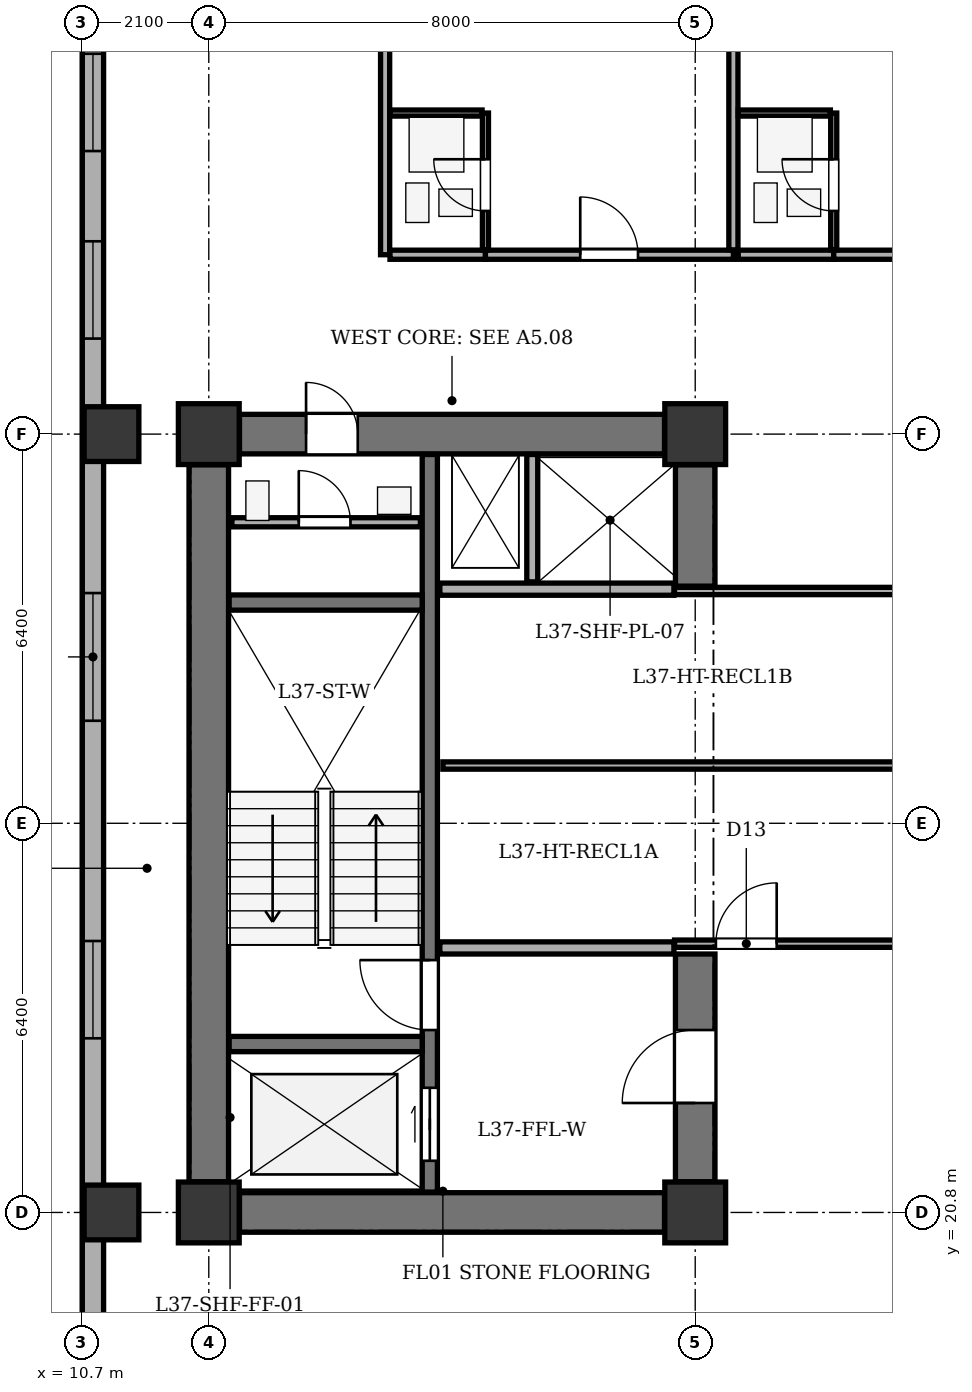
"""IFC4 building model, lengths in metres.
Left out: names, types, materials, properties, quantities, classifications, styles, units other than length and angle.
Written with IfcOpenShell. Run it as: python <this file> out.ifc"""

import sys

from ifc_helpers import new_model, si_unit, direction, frame, frame_2d, origin, origin_2d, place, context, subcontext, project, spatial, rectangle, extrude, element, fill, save


model = new_model("IFC4")
c1 = context("Model", 3, precision=1e-05, world=origin(), true_north=direction((0.0, 1.0)))
c2 = subcontext(c1, "Body", "Model", "MODEL_VIEW")
j1 = project(units=[si_unit("LENGTHUNIT", "METRE"), si_unit("PLANEANGLEUNIT", "RADIAN")], contexts=[c1])
p1 = place(None, origin())
s1 = spatial("IfcSite", under=j1, at=p1, CompositionType="ELEMENT")
p2 = place(p1, origin())
s2 = spatial("IfcBuilding", under=s1, at=p2, CompositionType="ELEMENT")
p3 = place(p2, frame((0.0, 0.0, 148.3)))
s3 = spatial("IfcBuildingStorey", under=s2, at=p3, CompositionType="ELEMENT", Elevation=148.3)
for number, where, z_axis, x_axis in (
    (1, (12.8, 20.8, 0.0), (0.0, 0.0, 1.0), (1.0, 0.0, 0.0)),
    (2, (20.8, 20.8, 0.0), (0.0, 0.0, 1.0), (1.0, 0.0, 0.0)),
    (3, (12.8, 33.6, 0.0), (0.0, 0.0, 1.0), (1.0, 0.0, 0.0)),
    (4, (20.8, 33.6, 0.0), (0.0, 0.0, 1.0), (1.0, 0.0, 0.0)),
):
    element("IfcColumn", number, at=place(p3, frame(where, z_axis=z_axis, x_axis=x_axis)), inside=s3, PredefinedType="COLUMN", context=c2, shape_type="SweptSolid", body=[
        extrude(rectangle(XDim=1.0, YDim=1.0, at=origin_2d()), origin(), (0.0, 0.0, 1.0), 3.5),
    ])
for number, where, z_axis, x_axis in (
    (5, (11.2, 20.8, 0.0), (0.0, 0.0, 1.0), (1.0, 0.0, 0.0)),
    (6, (11.2, 33.6, 0.0), (0.0, 0.0, 1.0), (1.0, 0.0, 0.0)),
):
    element("IfcColumn", number, at=place(p3, frame(where, z_axis=z_axis, x_axis=x_axis)), inside=s3, PredefinedType="COLUMN", context=c2, shape_type="SweptSolid", body=[
        extrude(rectangle(XDim=0.9, YDim=0.9, at=origin_2d()), origin(), (0.0, 0.0, 1.0), 3.5),
    ])
p4 = place(p3, frame((10.895, 6.5, 0.0), z_axis=(0.0, 0.0, 1.0), x_axis=(0.0, 1.0, 0.0)))
e7 = element("IfcWall", 7, at=p4, inside=s3, PredefinedType="STANDARD", context=c2, shape_type="SweptSolid", body=[
    extrude(rectangle(XDim=35.0, YDim=0.35, at=frame_2d((17.5, 0.0))), origin(), (0.0, 0.0, 1.0), 2.785),
])
p5 = place(p4, frame((3.31, 0.0, 0.75)))
e8 = element("IfcOpeningElement", 8, at=p5, cuts=e7, PredefinedType="OPENING", context=c2, shape_type="SweptSolid", body=[
    extrude(rectangle(XDim=1.6, YDim=1.75, at=frame_2d((0.8, 0.875))), frame((0.0, 0.185, 0.0), z_axis=(0.0, -1.0, 0.0), x_axis=(1.0, 0.0, 0.0)), (0.0, 0.0, 1.0), 0.37),
])
p6 = place(p4, frame((9.216, 0.0, 0.75)))
e9 = element("IfcOpeningElement", 9, at=p6, cuts=e7, PredefinedType="OPENING", context=c2, shape_type="SweptSolid", body=[
    extrude(rectangle(XDim=2.1, YDim=1.75, at=frame_2d((1.05, 0.875))), frame((0.0, 0.185, 0.0), z_axis=(0.0, -1.0, 0.0), x_axis=(1.0, 0.0, 0.0)), (0.0, 0.0, 1.0), 0.37),
])
p7 = place(p4, frame((17.164, 0.0, 0.75)))
e10 = element("IfcOpeningElement", 10, at=p7, cuts=e7, PredefinedType="OPENING", context=c2, shape_type="SweptSolid", body=[
    extrude(rectangle(XDim=1.6, YDim=1.75, at=frame_2d((0.8, 0.875))), frame((0.0, 0.185, 0.0), z_axis=(0.0, -1.0, 0.0), x_axis=(1.0, 0.0, 0.0)), (0.0, 0.0, 1.0), 0.37),
])
p8 = place(p4, frame((22.386, 0.0, 0.75)))
e11 = element("IfcOpeningElement", 11, at=p8, cuts=e7, PredefinedType="OPENING", context=c2, shape_type="SweptSolid", body=[
    extrude(rectangle(XDim=2.1, YDim=1.75, at=frame_2d((1.05, 0.875))), frame((0.0, 0.185, 0.0), z_axis=(0.0, -1.0, 0.0), x_axis=(1.0, 0.0, 0.0)), (0.0, 0.0, 1.0), 0.37),
])
p9 = place(p4, frame((28.671, 0.0, 0.75)))
e12 = element("IfcOpeningElement", 12, at=p9, cuts=e7, PredefinedType="OPENING", context=c2, shape_type="SweptSolid", body=[
    extrude(rectangle(XDim=1.6, YDim=1.75, at=frame_2d((0.8, 0.875))), frame((0.0, 0.185, 0.0), z_axis=(0.0, -1.0, 0.0), x_axis=(1.0, 0.0, 0.0)), (0.0, 0.0, 1.0), 0.37),
])
p10 = place(p4, frame((31.755, 0.0, 0.75)))
e13 = element("IfcOpeningElement", 13, at=p10, cuts=e7, PredefinedType="OPENING", context=c2, shape_type="SweptSolid", body=[
    extrude(rectangle(XDim=1.6, YDim=1.75, at=frame_2d((0.8, 0.875))), frame((0.0, 0.185, 0.0), z_axis=(0.0, -1.0, 0.0), x_axis=(1.0, 0.0, 0.0)), (0.0, 0.0, 1.0), 0.37),
])
p11 = place(p3, frame((12.8, 21.305, 0.0), z_axis=(0.0, 0.0, 1.0), x_axis=(0.0, 1.0, 0.0)))
e14 = element("IfcWall", 14, at=p11, inside=s3, PredefinedType="SHEAR", context=c2, shape_type="SweptSolid", body=[
    extrude(rectangle(XDim=11.79, YDim=0.65, at=frame_2d((5.895, 0.0))), origin(), (0.0, 0.0, 1.0), 3.2),
])
p12 = place(p3, frame((13.305, 20.8, 0.0), z_axis=(0.0, 0.0, 1.0), x_axis=(1.0, 0.0, 0.0)))
e15 = element("IfcWall", 15, at=p12, inside=s3, PredefinedType="SHEAR", context=c2, shape_type="SweptSolid", body=[
    extrude(rectangle(XDim=6.99, YDim=0.65, at=frame_2d((3.495, 0.0))), origin(), (0.0, 0.0, 1.0), 3.2),
])
p13 = place(p3, frame((13.305, 33.6, 0.0), z_axis=(0.0, 0.0, 1.0), x_axis=(1.0, 0.0, 0.0)))
e16 = element("IfcWall", 16, at=p13, inside=s3, PredefinedType="SHEAR", context=c2, shape_type="SweptSolid", body=[
    extrude(rectangle(XDim=6.99, YDim=0.65, at=frame_2d((3.495, 0.0))), origin(), (0.0, 0.0, 1.0), 3.2),
])
p14 = place(p13, frame((1.095, 0.0, 0.0)))
e17 = element("IfcOpeningElement", 17, at=p14, cuts=e16, PredefinedType="OPENING", context=c2, shape_type="SweptSolid", body=[
    extrude(rectangle(XDim=0.85, YDim=2.02, at=frame_2d((0.425, 1.01))), frame((0.0, 0.335, 0.0), z_axis=(0.0, -1.0, 0.0), x_axis=(1.0, 0.0, 0.0)), (0.0, 0.0, 1.0), 0.67),
])
p15 = place(p3, frame((20.8, 21.305, 0.0), z_axis=(0.0, 0.0, 1.0), x_axis=(0.0, 1.0, 0.0)))
e18 = element("IfcWall", 18, at=p15, inside=s3, PredefinedType="SHEAR", context=c2, shape_type="SweptSolid", body=[
    extrude(rectangle(XDim=3.745, YDim=0.65, at=frame_2d((1.873, 0.0))), origin(), (0.0, 0.0, 1.0), 3.2),
])
p16 = place(p15, frame((1.295, 0.0, 0.0)))
e19 = element("IfcOpeningElement", 19, at=p16, cuts=e18, PredefinedType="OPENING", context=c2, shape_type="SweptSolid", body=[
    extrude(rectangle(XDim=1.2, YDim=2.15, at=frame_2d((0.6, 1.075))), frame((0.0, 0.335, 0.0), z_axis=(0.0, -1.0, 0.0), x_axis=(1.0, 0.0, 0.0)), (0.0, 0.0, 1.0), 0.67),
])
p17 = place(p3, frame((20.8, 31.1, 0.0), z_axis=(0.0, 0.0, 1.0), x_axis=(0.0, 1.0, 0.0)))
e20 = element("IfcWall", 20, at=p17, inside=s3, PredefinedType="SHEAR", context=c2, shape_type="SweptSolid", body=[
    extrude(rectangle(XDim=1.995, YDim=0.65, at=frame_2d((0.998, 0.0))), origin(), (0.0, 0.0, 1.0), 3.2),
])
p18 = place(p3, frame((16.435, 21.135, 0.0), z_axis=(0.0, 0.0, 1.0), x_axis=(0.0, 1.0, 0.0)))
e21 = element("IfcWall", 21, at=p18, inside=s3, PredefinedType="SHEAR", context=c2, shape_type="SweptSolid", body=[
    extrude(rectangle(XDim=12.13, YDim=0.25, at=frame_2d((6.065, 0.0))), origin(), (0.0, 0.0, 1.0), 3.2),
])
p19 = place(p18, frame((0.515, 0.0, 0.0)))
e22 = element("IfcOpeningElement", 22, at=p19, cuts=e21, PredefinedType="OPENING", context=c2, shape_type="SweptSolid", body=[
    extrude(rectangle(XDim=1.2, YDim=2.15, at=frame_2d((0.6, 1.075))), frame((0.0, 0.135, 0.0), z_axis=(0.0, -1.0, 0.0), x_axis=(1.0, 0.0, 0.0)), (0.0, 0.0, 1.0), 0.27),
])
p20 = place(p18, frame((2.665, 0.0, 0.0)))
e23 = element("IfcOpeningElement", 23, at=p20, cuts=e21, PredefinedType="OPENING", context=c2, shape_type="SweptSolid", body=[
    extrude(rectangle(XDim=1.15, YDim=2.15, at=frame_2d((0.575, 1.075))), frame((0.0, 0.135, 0.0), z_axis=(0.0, -1.0, 0.0), x_axis=(1.0, 0.0, 0.0)), (0.0, 0.0, 1.0), 0.27),
])
for number, where, z_axis, x_axis in (
    (24, (13.135, 23.57, 0.0), (0.0, 0.0, 1.0), (1.0, 0.0, 0.0)),
    (25, (13.135, 30.83, 0.0), (0.0, 0.0, 1.0), (1.0, 0.0, 0.0)),
):
    element("IfcWall", number, at=place(p3, frame(where, z_axis=z_axis, x_axis=x_axis)), inside=s3, PredefinedType="SHEAR", context=c2, shape_type="SweptSolid", body=[
        extrude(rectangle(XDim=3.175, YDim=0.25, at=frame_2d((1.587, 0.0))), origin(), (0.0, 0.0, 1.0), 3.2),
    ])
for number, where, z_axis, x_axis in (
    (26, (16.6, 25.15, 0.0), (0.0, 0.0, 1.0), (1.0, 0.0, 0.0)),
    (27, (16.6, 31.05, 0.0), (0.0, 0.0, 1.0), (1.0, 0.0, 0.0)),
):
    element("IfcWall", number, at=place(p3, frame(where, z_axis=z_axis, x_axis=x_axis)), inside=s3, PredefinedType="SOLIDWALL", context=c2, shape_type="SweptSolid", body=[
        extrude(rectangle(XDim=3.85, YDim=0.2, at=frame_2d((1.925, 0.0))), origin(), (0.0, 0.0, 1.0), 3.2),
    ])
p21 = place(p3, frame((18.12, 31.17, 0.0), z_axis=(0.0, 0.0, 1.0), x_axis=(0.0, 1.0, 0.0)))
e28 = element("IfcWall", 28, at=p21, inside=s3, PredefinedType="PARTITIONING", context=c2, shape_type="SweptSolid", body=[
    extrude(rectangle(XDim=2.095, YDim=0.18, at=frame_2d((1.047, 0.0))), origin(), (0.0, 0.0, 1.0), 3.2),
])
p22 = place(p3, frame((13.18, 32.15, 0.0), z_axis=(0.0, 0.0, 1.0), x_axis=(1.0, 0.0, 0.0)))
e29 = element("IfcWall", 29, at=p22, inside=s3, PredefinedType="PARTITIONING", context=c2, shape_type="SweptSolid", body=[
    extrude(rectangle(XDim=3.1, YDim=0.15, at=frame_2d((1.55, 0.0))), origin(), (0.0, 0.0, 1.0), 3.2),
])
p23 = place(p22, frame((1.1, 0.0, 0.0)))
e30 = element("IfcOpeningElement", 30, at=p23, cuts=e29, PredefinedType="OPENING", context=c2, shape_type="SweptSolid", body=[
    extrude(rectangle(XDim=0.85, YDim=2.02, at=frame_2d((0.425, 1.01))), frame((0.0, 0.085, 0.0), z_axis=(0.0, -1.0, 0.0), x_axis=(1.0, 0.0, 0.0)), (0.0, 0.0, 1.0), 0.17),
])
p24 = place(p3, frame((20.46, 25.22, 0.0), z_axis=(0.0, 0.0, 1.0), x_axis=(1.0, 0.0, 0.0)))
e31 = element("IfcWall", 31, at=p24, inside=s3, PredefinedType="PARTITIONING", context=c2, shape_type="SweptSolid", body=[
    extrude(rectangle(XDim=11.94, YDim=0.12, at=frame_2d((5.97, 0.0))), origin(), (0.0, 0.0, 1.0), 3.2),
])
p25 = place(p24, frame((0.68, 0.0, 0.0)))
e32 = element("IfcOpeningElement", 32, at=p25, cuts=e31, PredefinedType="OPENING", context=c2, shape_type="SweptSolid", body=[
    extrude(rectangle(XDim=1.0, YDim=2.1, at=frame_2d((0.5, 1.05))), frame((0.0, 0.07, 0.0), z_axis=(0.0, -1.0, 0.0), x_axis=(1.0, 0.0, 0.0)), (0.0, 0.0, 1.0), 0.14),
])
p26 = place(p3, frame((20.46, 31.02, 0.0), z_axis=(0.0, 0.0, 1.0), x_axis=(1.0, 0.0, 0.0)))
e33 = element("IfcWall", 33, at=p26, inside=s3, PredefinedType="PARTITIONING", context=c2, shape_type="SweptSolid", body=[
    extrude(rectangle(XDim=11.94, YDim=0.12, at=frame_2d((5.97, 0.0))), origin(), (0.0, 0.0, 1.0), 3.2),
])
p27 = place(p3, frame((16.65, 28.15, 0.0), z_axis=(0.0, 0.0, 1.0), x_axis=(1.0, 0.0, 0.0)))
e34 = element("IfcWall", 34, at=p27, inside=s3, PredefinedType="PARTITIONING", context=c2, shape_type="SweptSolid", body=[
    extrude(rectangle(XDim=8.885, YDim=0.12, at=frame_2d((4.442, 0.0))), origin(), (0.0, 0.0, 1.0), 3.2),
])
p28 = place(p3, frame((15.7, 36.55, 0.0), z_axis=(0.0, 0.0, 1.0), x_axis=(0.0, 1.0, 0.0)))
e35 = element("IfcWall", 35, at=p28, inside=s3, PredefinedType="PARTITIONING", context=c2, shape_type="SweptSolid", body=[
    extrude(rectangle(XDim=9.575, YDim=0.15, at=frame_2d((4.788, 0.0))), origin(), (0.0, 0.0, 1.0), 3.2),
])
p29 = place(p3, frame((15.78, 36.55, 0.0), z_axis=(0.0, 0.0, 1.0), x_axis=(1.0, 0.0, 0.0)))
e36 = element("IfcWall", 36, at=p29, inside=s3, PredefinedType="PARTITIONING", context=c2, shape_type="SweptSolid", body=[
    extrude(rectangle(XDim=1.57, YDim=0.15, at=frame_2d((0.785, 0.0))), origin(), (0.0, 0.0, 1.0), 3.2),
])
p30 = place(p3, frame((17.35, 36.55, 0.0), z_axis=(0.0, 0.0, 1.0), x_axis=(1.0, 0.0, 0.0)))
e37 = element("IfcWall", 37, at=p30, inside=s3, PredefinedType="PARTITIONING", context=c2, shape_type="SweptSolid", body=[
    extrude(rectangle(XDim=4.078, YDim=0.15, at=frame_2d((2.039, 0.0))), origin(), (0.0, 0.0, 1.0), 3.2),
])
p31 = place(p30, frame((1.559, 0.0, 0.0)))
e38 = element("IfcOpeningElement", 38, at=p31, cuts=e37, PredefinedType="OPENING", context=c2, shape_type="SweptSolid", body=[
    extrude(rectangle(XDim=0.95, YDim=2.1, at=frame_2d((0.475, 1.05))), frame((0.0, 0.085, 0.0), z_axis=(0.0, -1.0, 0.0), x_axis=(1.0, 0.0, 0.0)), (0.0, 0.0, 1.0), 0.17),
])
p32 = place(p3, frame((17.35, 36.63, 0.0), z_axis=(0.0, 0.0, 1.0), x_axis=(0.0, 1.0, 0.0)))
e39 = element("IfcWall", 39, at=p32, inside=s3, PredefinedType="PARTITIONING", context=c2, shape_type="SweptSolid", body=[
    extrude(rectangle(XDim=2.25, YDim=0.1, at=frame_2d((1.125, 0.0))), origin(), (0.0, 0.0, 1.0), 3.2),
])
p33 = place(p32, frame((0.64, 0.0, 0.0)))
e40 = element("IfcOpeningElement", 40, at=p33, cuts=e39, PredefinedType="OPENING", context=c2, shape_type="SweptSolid", body=[
    extrude(rectangle(XDim=0.85, YDim=2.05, at=frame_2d((0.425, 1.025))), frame((0.0, 0.06, 0.0), z_axis=(0.0, -1.0, 0.0), x_axis=(1.0, 0.0, 0.0)), (0.0, 0.0, 1.0), 0.12),
])
p34 = place(p3, frame((15.78, 38.88, 0.0), z_axis=(0.0, 0.0, 1.0), x_axis=(1.0, 0.0, 0.0)))
e41 = element("IfcWall", 41, at=p34, inside=s3, PredefinedType="PARTITIONING", context=c2, shape_type="SweptSolid", body=[
    extrude(rectangle(XDim=1.515, YDim=0.1, at=frame_2d((0.757, 0.0))), origin(), (0.0, 0.0, 1.0), 3.2),
])
p35 = place(p3, frame((21.428, 36.63, 0.0), z_axis=(0.0, 0.0, 1.0), x_axis=(0.0, 1.0, 0.0)))
e42 = element("IfcWall", 42, at=p35, inside=s3, PredefinedType="PARTITIONING", context=c2, shape_type="SweptSolid", body=[
    extrude(rectangle(XDim=9.495, YDim=0.15, at=frame_2d((4.748, 0.0))), origin(), (0.0, 0.0, 1.0), 3.2),
])
p36 = place(p3, frame((21.508, 36.55, 0.0), z_axis=(0.0, 0.0, 1.0), x_axis=(1.0, 0.0, 0.0)))
e43 = element("IfcWall", 43, at=p36, inside=s3, PredefinedType="PARTITIONING", context=c2, shape_type="SweptSolid", body=[
    extrude(rectangle(XDim=1.57, YDim=0.15, at=frame_2d((0.785, 0.0))), origin(), (0.0, 0.0, 1.0), 3.2),
])
p37 = place(p3, frame((23.078, 36.55, 0.0), z_axis=(0.0, 0.0, 1.0), x_axis=(1.0, 0.0, 0.0)))
e44 = element("IfcWall", 44, at=p37, inside=s3, PredefinedType="PARTITIONING", context=c2, shape_type="SweptSolid", body=[
    extrude(rectangle(XDim=4.381, YDim=0.15, at=frame_2d((2.19, 0.0))), origin(), (0.0, 0.0, 1.0), 3.2),
])
p38 = place(p37, frame((1.71, 0.0, 0.0)))
e45 = element("IfcOpeningElement", 45, at=p38, cuts=e44, PredefinedType="OPENING", context=c2, shape_type="SweptSolid", body=[
    extrude(rectangle(XDim=0.95, YDim=2.1, at=frame_2d((0.475, 1.05))), frame((0.0, 0.085, 0.0), z_axis=(0.0, -1.0, 0.0), x_axis=(1.0, 0.0, 0.0)), (0.0, 0.0, 1.0), 0.17),
])
p39 = place(p3, frame((23.078, 36.63, 0.0), z_axis=(0.0, 0.0, 1.0), x_axis=(0.0, 1.0, 0.0)))
e46 = element("IfcWall", 46, at=p39, inside=s3, PredefinedType="PARTITIONING", context=c2, shape_type="SweptSolid", body=[
    extrude(rectangle(XDim=2.25, YDim=0.1, at=frame_2d((1.125, 0.0))), origin(), (0.0, 0.0, 1.0), 3.2),
])
p40 = place(p39, frame((0.64, 0.0, 0.0)))
e47 = element("IfcOpeningElement", 47, at=p40, cuts=e46, PredefinedType="OPENING", context=c2, shape_type="SweptSolid", body=[
    extrude(rectangle(XDim=0.85, YDim=2.05, at=frame_2d((0.425, 1.025))), frame((0.0, 0.06, 0.0), z_axis=(0.0, -1.0, 0.0), x_axis=(1.0, 0.0, 0.0)), (0.0, 0.0, 1.0), 0.12),
])
p41 = place(p3, frame((21.508, 38.88, 0.0), z_axis=(0.0, 0.0, 1.0), x_axis=(1.0, 0.0, 0.0)))
e48 = element("IfcWall", 48, at=p41, inside=s3, PredefinedType="PARTITIONING", context=c2, shape_type="SweptSolid", body=[
    extrude(rectangle(XDim=1.515, YDim=0.1, at=frame_2d((0.757, 0.0))), origin(), (0.0, 0.0, 1.0), 3.2),
])
p42 = place(p7, origin())
e49 = element("IfcWindow", 49, at=p42, inside=s3, PartitioningType="SINGLE_PANEL", PredefinedType="WINDOW", context=c2, shape_type="SweptSolid", body=[
    extrude(rectangle(XDim=1.6, YDim=1.75, at=frame_2d((0.8, 0.875))), frame((0.0, -0.01, 0.0), z_axis=(0.0, -1.0, 0.0), x_axis=(1.0, 0.0, 0.0)), (0.0, 0.0, 1.0), 0.06),
])
fill(e10, e49)
p43 = place(p8, origin())
e50 = element("IfcWindow", 50, at=p43, inside=s3, PartitioningType="SINGLE_PANEL", PredefinedType="WINDOW", context=c2, shape_type="SweptSolid", body=[
    extrude(rectangle(XDim=2.1, YDim=1.75, at=frame_2d((1.05, 0.875))), frame((0.0, -0.01, 0.0), z_axis=(0.0, -1.0, 0.0), x_axis=(1.0, 0.0, 0.0)), (0.0, 0.0, 1.0), 0.06),
])
fill(e11, e50)
p44 = place(p9, origin())
e51 = element("IfcWindow", 51, at=p44, inside=s3, PartitioningType="SINGLE_PANEL", PredefinedType="WINDOW", context=c2, shape_type="SweptSolid", body=[
    extrude(rectangle(XDim=1.6, YDim=1.75, at=frame_2d((0.8, 0.875))), frame((0.0, -0.01, 0.0), z_axis=(0.0, -1.0, 0.0), x_axis=(1.0, 0.0, 0.0)), (0.0, 0.0, 1.0), 0.06),
])
fill(e12, e51)
p45 = place(p10, origin())
e52 = element("IfcWindow", 52, at=p45, inside=s3, PartitioningType="SINGLE_PANEL", PredefinedType="WINDOW", context=c2, shape_type="SweptSolid", body=[
    extrude(rectangle(XDim=1.6, YDim=1.75, at=frame_2d((0.8, 0.875))), frame((0.0, -0.01, 0.0), z_axis=(0.0, -1.0, 0.0), x_axis=(1.0, 0.0, 0.0)), (0.0, 0.0, 1.0), 0.06),
])
fill(e13, e52)
p46 = place(p14, origin())
e53 = element("IfcDoor", 53, at=p46, inside=s3, OperationType="SINGLE_SWING_LEFT", PredefinedType="DOOR", context=c2, shape_type="SweptSolid", body=[
    extrude(rectangle(XDim=0.85, YDim=2.02, at=frame_2d((0.425, 1.01))), frame((0.0, 0.025, 0.0), z_axis=(0.0, -1.0, 0.0), x_axis=(1.0, 0.0, 0.0)), (0.0, 0.0, 1.0), 0.05),
])
fill(e17, e53)
p47 = place(p16, origin())
e54 = element("IfcDoor", 54, at=p47, inside=s3, OperationType="SINGLE_SWING_LEFT", PredefinedType="DOOR", context=c2, shape_type="SweptSolid", body=[
    extrude(rectangle(XDim=1.2, YDim=2.15, at=frame_2d((0.6, 1.075))), frame((0.0, 0.025, 0.0), z_axis=(0.0, -1.0, 0.0), x_axis=(1.0, 0.0, 0.0)), (0.0, 0.0, 1.0), 0.05),
])
fill(e19, e54)
p48 = place(p19, origin())
e55 = element("IfcDoor", 55, at=p48, inside=s3, OperationType="DOUBLE_DOOR_SLIDING", PredefinedType="DOOR", context=c2, shape_type="SweptSolid", body=[
    extrude(rectangle(XDim=1.2, YDim=2.15, at=frame_2d((0.6, 1.075))), frame((0.0, 0.025, 0.0), z_axis=(0.0, -1.0, 0.0), x_axis=(1.0, 0.0, 0.0)), (0.0, 0.0, 1.0), 0.05),
])
fill(e22, e55)
p49 = place(p20, origin())
e56 = element("IfcDoor", 56, at=p49, inside=s3, OperationType="SINGLE_SWING_RIGHT", PredefinedType="DOOR", context=c2, shape_type="SweptSolid", body=[
    extrude(rectangle(XDim=1.15, YDim=2.15, at=frame_2d((0.575, 1.075))), frame((0.0, 0.025, 0.0), z_axis=(0.0, -1.0, 0.0), x_axis=(1.0, 0.0, 0.0)), (0.0, 0.0, 1.0), 0.05),
])
fill(e23, e56)
p50 = place(p23, origin())
e57 = element("IfcDoor", 57, at=p50, inside=s3, OperationType="SINGLE_SWING_LEFT", PredefinedType="DOOR", context=c2, shape_type="SweptSolid", body=[
    extrude(rectangle(XDim=0.85, YDim=2.02, at=frame_2d((0.425, 1.01))), frame((0.0, 0.025, 0.0), z_axis=(0.0, -1.0, 0.0), x_axis=(1.0, 0.0, 0.0)), (0.0, 0.0, 1.0), 0.05),
])
fill(e30, e57)
p51 = place(p25, origin())
e58 = element("IfcDoor", 58, at=p51, inside=s3, OperationType="SINGLE_SWING_RIGHT", PredefinedType="DOOR", context=c2, shape_type="SweptSolid", body=[
    extrude(rectangle(XDim=1.0, YDim=2.1, at=frame_2d((0.5, 1.05))), frame((0.0, 0.025, 0.0), z_axis=(0.0, -1.0, 0.0), x_axis=(1.0, 0.0, 0.0)), (0.0, 0.0, 1.0), 0.05),
])
fill(e32, e58)
p52 = place(p33, origin())
e59 = element("IfcDoor", 59, at=p52, inside=s3, OperationType="SINGLE_SWING_RIGHT", PredefinedType="DOOR", context=c2, shape_type="SweptSolid", body=[
    extrude(rectangle(XDim=0.85, YDim=2.05, at=frame_2d((0.425, 1.025))), frame((0.0, 0.025, 0.0), z_axis=(0.0, -1.0, 0.0), x_axis=(1.0, 0.0, 0.0)), (0.0, 0.0, 1.0), 0.05),
])
fill(e40, e59)
p53 = place(p31, origin())
e60 = element("IfcDoor", 60, at=p53, inside=s3, OperationType="SINGLE_SWING_LEFT", PredefinedType="DOOR", context=c2, shape_type="SweptSolid", body=[
    extrude(rectangle(XDim=0.95, YDim=2.1, at=frame_2d((0.475, 1.05))), frame((0.0, 0.025, 0.0), z_axis=(0.0, -1.0, 0.0), x_axis=(1.0, 0.0, 0.0)), (0.0, 0.0, 1.0), 0.05),
])
fill(e38, e60)
p54 = place(p40, origin())
e61 = element("IfcDoor", 61, at=p54, inside=s3, OperationType="SINGLE_SWING_RIGHT", PredefinedType="DOOR", context=c2, shape_type="SweptSolid", body=[
    extrude(rectangle(XDim=0.85, YDim=2.05, at=frame_2d((0.425, 1.025))), frame((0.0, 0.025, 0.0), z_axis=(0.0, -1.0, 0.0), x_axis=(1.0, 0.0, 0.0)), (0.0, 0.0, 1.0), 0.05),
])
fill(e47, e61)
save(model, sys.argv[1])
